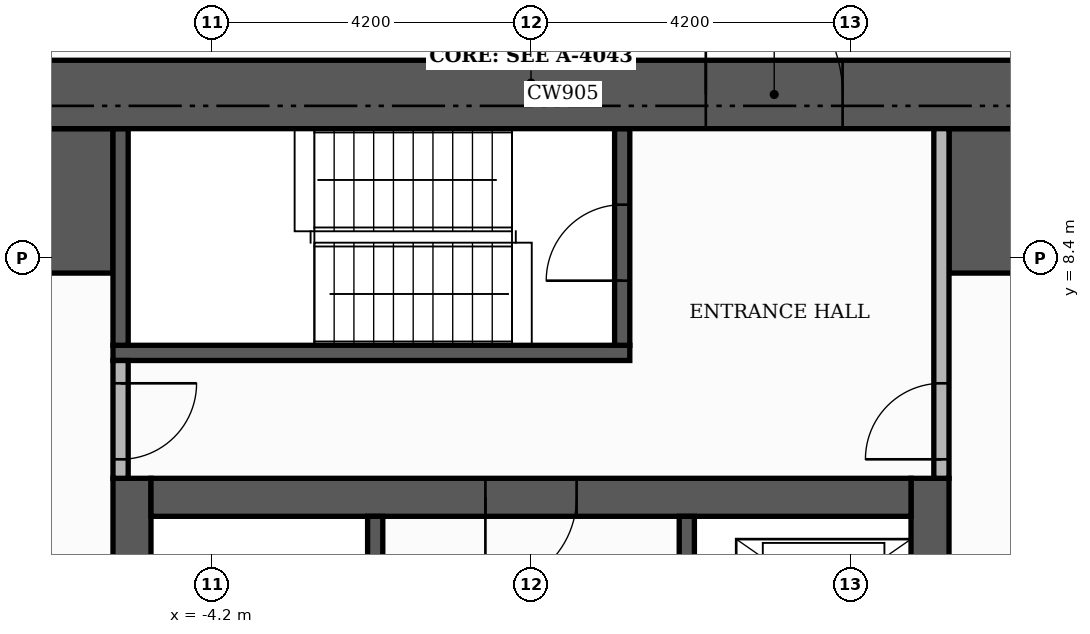
"""IFC4 building model, lengths in metres.
Left out: names, types, materials, properties, quantities, classifications, styles, units other than length and angle.
Written with IfcOpenShell. Run it as: python <this file> out.ifc"""

import sys

from ifc_helpers import new_model, si_unit, direction, frame, frame_2d, origin, place, context, subcontext, project, spatial, rectangle, extrude, element, fill, save


model = new_model("IFC4")
c1 = context("Model", 3, precision=1e-05, world=origin(), true_north=direction((0.0, 1.0)))
c2 = subcontext(c1, "Body", "Model", "MODEL_VIEW")
j1 = project(units=[si_unit("LENGTHUNIT", "METRE"), si_unit("PLANEANGLEUNIT", "RADIAN")], contexts=[c1])
p1 = place(None, origin())
s1 = spatial("IfcSite", under=j1, at=p1, CompositionType="ELEMENT")
p2 = place(p1, origin())
s2 = spatial("IfcBuilding", under=s1, at=p2, CompositionType="ELEMENT")
p3 = place(p2, frame((0.0, 0.0, 264.0)))
s3 = spatial("IfcBuildingStorey", under=s2, at=p3, CompositionType="ELEMENT", Elevation=264.0)
for number, where, z_axis, x_axis in (
    (1, (-5.25, -5.0, 0.0), (0.0, 0.0, 1.0), (0.0, 1.0, 0.0)),
    (2, (5.25, -5.0, 0.0), (0.0, 0.0, 1.0), (0.0, 1.0, 0.0)),
):
    element("IfcWall", number, at=place(p3, frame(where, z_axis=z_axis, x_axis=x_axis)), inside=s3, PredefinedType="SHEAR", context=c2, shape_type="SweptSolid", body=[
        extrude(rectangle(XDim=10.5, YDim=0.5, at=frame_2d((5.25, 0.0))), origin(), (0.0, 0.0, 1.0), 3.48),
    ])
p4 = place(p3, frame((-5.0, 5.25, 0.0), z_axis=(0.0, 0.0, 1.0), x_axis=(1.0, 0.0, 0.0)))
e3 = element("IfcWall", 3, at=p4, inside=s3, PredefinedType="SHEAR", context=c2, shape_type="SweptSolid", body=[
    extrude(rectangle(XDim=10.0, YDim=0.5, at=frame_2d((5.0, 0.0))), origin(), (0.0, 0.0, 1.0), 3.48),
])
p5 = place(p4, frame((4.4, 0.0, 0.0)))
e4 = element("IfcOpeningElement", 4, at=p5, cuts=e3, PredefinedType="OPENING", context=c2, shape_type="SweptSolid", body=[
    extrude(rectangle(XDim=1.2, YDim=2.1, at=frame_2d((0.6, 1.05))), frame((0.0, 0.26, 0.0), z_axis=(0.0, -1.0, 0.0), x_axis=(1.0, 0.0, 0.0)), (0.0, 0.0, 1.0), 0.52),
])
for number, where, z_axis, x_axis in (
    (5, (-10.1, 9.15, 0.0), (0.0, 0.0, 1.0), (1.0, 0.0, 0.0)),
    (6, (5.5, 9.15, 0.0), (0.0, 0.0, 1.0), (1.0, 0.0, 0.0)),
):
    element("IfcWall", number, at=place(p3, frame(where, z_axis=z_axis, x_axis=x_axis)), inside=s3, PredefinedType="SHEAR", context=c2, shape_type="SweptSolid", body=[
        extrude(rectangle(XDim=4.6, YDim=1.9, at=frame_2d((2.3, 0.0))), origin(), (0.0, 0.0, 1.0), 3.48),
    ])
p6 = place(p3, frame((-2.05, -1.4, 0.0), z_axis=(0.0, 0.0, 1.0), x_axis=(0.0, 1.0, 0.0)))
e7 = element("IfcWall", 7, at=p6, inside=s3, PredefinedType="SHEAR", context=c2, shape_type="SweptSolid", body=[
    extrude(rectangle(XDim=6.4, YDim=0.2, at=frame_2d((3.2, 0.0))), origin(), (0.0, 0.0, 1.0), 3.48),
])
p7 = place(p6, frame((0.15, 0.0, 0.0)))
e8 = element("IfcOpeningElement", 8, at=p7, cuts=e7, PredefinedType="OPENING", context=c2, shape_type="SweptSolid", body=[
    extrude(rectangle(XDim=1.0, YDim=2.1, at=frame_2d((0.5, 1.05))), frame((0.0, 0.11, 0.0), z_axis=(0.0, -1.0, 0.0), x_axis=(1.0, 0.0, 0.0)), (0.0, 0.0, 1.0), 0.22),
])
p8 = place(p3, frame((-5.5, 7.15, 0.0), z_axis=(0.0, 0.0, 1.0), x_axis=(1.0, 0.0, 0.0)))
e9 = element("IfcWall", 9, at=p8, inside=s3, PredefinedType="SHEAR", context=c2, shape_type="SweptSolid", body=[
    extrude(rectangle(XDim=6.8, YDim=0.2, at=frame_2d((3.4, 0.0))), origin(), (0.0, 0.0, 1.0), 3.48),
])
p9 = place(p3, frame((-5.4, 7.25, 0.0), z_axis=(0.0, 0.0, 1.0), x_axis=(0.0, 1.0, 0.0)))
e10 = element("IfcWall", 10, at=p9, inside=s3, PredefinedType="SHEAR", context=c2, shape_type="SweptSolid", body=[
    extrude(rectangle(XDim=2.85, YDim=0.2, at=frame_2d((1.425, 0.0))), origin(), (0.0, 0.0, 1.0), 3.48),
])
p10 = place(p3, frame((1.2, 7.25, 0.0), z_axis=(0.0, 0.0, 1.0), x_axis=(0.0, 1.0, 0.0)))
e11 = element("IfcWall", 11, at=p10, inside=s3, PredefinedType="SHEAR", context=c2, shape_type="SweptSolid", body=[
    extrude(rectangle(XDim=2.85, YDim=0.2, at=frame_2d((1.425, 0.0))), origin(), (0.0, 0.0, 1.0), 3.48),
])
p11 = place(p10, frame((0.85, 0.0, 0.0)))
e12 = element("IfcOpeningElement", 12, at=p11, cuts=e11, PredefinedType="OPENING", context=c2, shape_type="SweptSolid", body=[
    extrude(rectangle(XDim=1.0, YDim=2.1, at=frame_2d((0.5, 1.05))), frame((0.0, 0.11, 0.0), z_axis=(0.0, -1.0, 0.0), x_axis=(1.0, 0.0, 0.0)), (0.0, 0.0, 1.0), 0.22),
])
p12 = place(p3, frame((2.05, 1.6, 0.0), z_axis=(0.0, 0.0, 1.0), x_axis=(0.0, 1.0, 0.0)))
e13 = element("IfcWall", 13, at=p12, inside=s3, PredefinedType="SHEAR", context=c2, shape_type="SweptSolid", body=[
    extrude(rectangle(XDim=3.4, YDim=0.2, at=frame_2d((1.7, 0.0))), origin(), (0.0, 0.0, 1.0), 3.48),
])
p13 = place(p12, frame((1.75, 0.0, 0.0)))
e14 = element("IfcOpeningElement", 14, at=p13, cuts=e13, PredefinedType="OPENING", context=c2, shape_type="SweptSolid", body=[
    extrude(rectangle(XDim=1.1, YDim=2.1, at=frame_2d((0.55, 1.05))), frame((0.0, 0.11, 0.0), z_axis=(0.0, -1.0, 0.0), x_axis=(1.0, 0.0, 0.0)), (0.0, 0.0, 1.0), 0.22),
])
p14 = place(p12, frame((0.15, 0.0, 0.0)))
e15 = element("IfcOpeningElement", 15, at=p14, cuts=e13, PredefinedType="OPENING", context=c2, shape_type="SweptSolid", body=[
    extrude(rectangle(XDim=0.8, YDim=2.1, at=frame_2d((0.4, 1.05))), frame((0.0, 0.11, 0.0), z_axis=(0.0, -1.0, 0.0), x_axis=(1.0, 0.0, 0.0)), (0.0, 0.0, 1.0), 0.22),
])
p15 = place(p3, frame((-11.0, 10.55, 0.0), z_axis=(0.0, 0.0, 1.0), x_axis=(1.0, 0.0, 0.0)))
e16 = element("IfcWall", 16, at=p15, inside=s3, PredefinedType="SHEAR", context=c2, shape_type="SweptSolid", body=[
    extrude(rectangle(XDim=22.0, YDim=0.9, at=frame_2d((11.0, 0.0))), origin(), (0.0, 0.0, 1.0), 3.48),
])
p16 = place(p15, frame((13.3, 0.0, 0.0)))
e17 = element("IfcOpeningElement", 17, at=p16, cuts=e16, PredefinedType="OPENING", context=c2, shape_type="SweptSolid", body=[
    extrude(rectangle(XDim=1.8, YDim=2.2, at=frame_2d((0.9, 1.1))), frame((0.0, 0.46, 0.0), z_axis=(0.0, -1.0, 0.0), x_axis=(1.0, 0.0, 0.0)), (0.0, 0.0, 1.0), 0.92),
])
p17 = place(p3, frame((-5.4, 5.5, 0.0), z_axis=(0.0, 0.0, 1.0), x_axis=(0.0, 1.0, 0.0)))
e18 = element("IfcWall", 18, at=p17, inside=s3, PredefinedType="PARTITIONING", context=c2, shape_type="SweptSolid", body=[
    extrude(rectangle(XDim=1.55, YDim=0.2, at=frame_2d((0.775, 0.0))), origin(), (0.0, 0.0, 1.0), 3.48),
])
p18 = place(p17, frame((0.25, 0.0, 0.0)))
e19 = element("IfcOpeningElement", 19, at=p18, cuts=e18, PredefinedType="OPENING", context=c2, shape_type="SweptSolid", body=[
    extrude(rectangle(XDim=1.0, YDim=2.1, at=frame_2d((0.5, 1.05))), frame((0.0, 0.11, 0.0), z_axis=(0.0, -1.0, 0.0), x_axis=(1.0, 0.0, 0.0)), (0.0, 0.0, 1.0), 0.22),
])
p19 = place(p3, frame((5.4, 5.5, 0.0), z_axis=(0.0, 0.0, 1.0), x_axis=(0.0, 1.0, 0.0)))
e20 = element("IfcWall", 20, at=p19, inside=s3, PredefinedType="PARTITIONING", context=c2, shape_type="SweptSolid", body=[
    extrude(rectangle(XDim=4.6, YDim=0.2, at=frame_2d((2.3, 0.0))), origin(), (0.0, 0.0, 1.0), 3.48),
])
p20 = place(p19, frame((0.25, 0.0, 0.0)))
e21 = element("IfcOpeningElement", 21, at=p20, cuts=e20, PredefinedType="OPENING", context=c2, shape_type="SweptSolid", body=[
    extrude(rectangle(XDim=1.0, YDim=2.1, at=frame_2d((0.5, 1.05))), frame((0.0, 0.11, 0.0), z_axis=(0.0, -1.0, 0.0), x_axis=(1.0, 0.0, 0.0)), (0.0, 0.0, 1.0), 0.22),
])
p21 = place(p5, frame((1.2, 0.0, 0.0), z_axis=(0.0, 0.0, 1.0), x_axis=(-1.0, 0.0, 0.0)))
e22 = element("IfcDoor", 22, at=p21, inside=s3, OperationType="SINGLE_SWING_LEFT", PredefinedType="DOOR", context=c2, shape_type="SweptSolid", body=[
    extrude(rectangle(XDim=1.2, YDim=2.1, at=frame_2d((0.6, 1.05))), frame((0.0, 0.025, 0.0), z_axis=(0.0, -1.0, 0.0), x_axis=(1.0, 0.0, 0.0)), (0.0, 0.0, 1.0), 0.05),
])
fill(e4, e22)
p22 = place(p11, origin())
e23 = element("IfcDoor", 23, at=p22, inside=s3, OperationType="SINGLE_SWING_LEFT", PredefinedType="DOOR", context=c2, shape_type="SweptSolid", body=[
    extrude(rectangle(XDim=1.0, YDim=2.1, at=frame_2d((0.5, 1.05))), frame((0.0, 0.025, 0.0), z_axis=(0.0, -1.0, 0.0), x_axis=(1.0, 0.0, 0.0)), (0.0, 0.0, 1.0), 0.05),
])
fill(e12, e23)
p23 = place(p18, frame((1.0, 0.0, 0.0), z_axis=(0.0, 0.0, 1.0), x_axis=(-1.0, 0.0, 0.0)))
e24 = element("IfcDoor", 24, at=p23, inside=s3, OperationType="SINGLE_SWING_RIGHT", PredefinedType="DOOR", context=c2, shape_type="SweptSolid", body=[
    extrude(rectangle(XDim=1.0, YDim=2.1, at=frame_2d((0.5, 1.05))), frame((0.0, 0.025, 0.0), z_axis=(0.0, -1.0, 0.0), x_axis=(1.0, 0.0, 0.0)), (0.0, 0.0, 1.0), 0.05),
])
fill(e19, e24)
p24 = place(p20, origin())
e25 = element("IfcDoor", 25, at=p24, inside=s3, OperationType="SINGLE_SWING_LEFT", PredefinedType="DOOR", context=c2, shape_type="SweptSolid", body=[
    extrude(rectangle(XDim=1.0, YDim=2.1, at=frame_2d((0.5, 1.05))), frame((0.0, 0.025, 0.0), z_axis=(0.0, -1.0, 0.0), x_axis=(1.0, 0.0, 0.0)), (0.0, 0.0, 1.0), 0.05),
])
fill(e21, e25)
p25 = place(p16, origin())
e26 = element("IfcDoor", 26, at=p25, inside=s3, OperationType="DOUBLE_DOOR_SINGLE_SWING", PredefinedType="DOOR", context=c2, shape_type="SweptSolid", body=[
    extrude(rectangle(XDim=1.8, YDim=2.2, at=frame_2d((0.9, 1.1))), frame((0.0, 0.025, 0.0), z_axis=(0.0, -1.0, 0.0), x_axis=(1.0, 0.0, 0.0)), (0.0, 0.0, 1.0), 0.05),
])
fill(e17, e26)
save(model, sys.argv[1])
